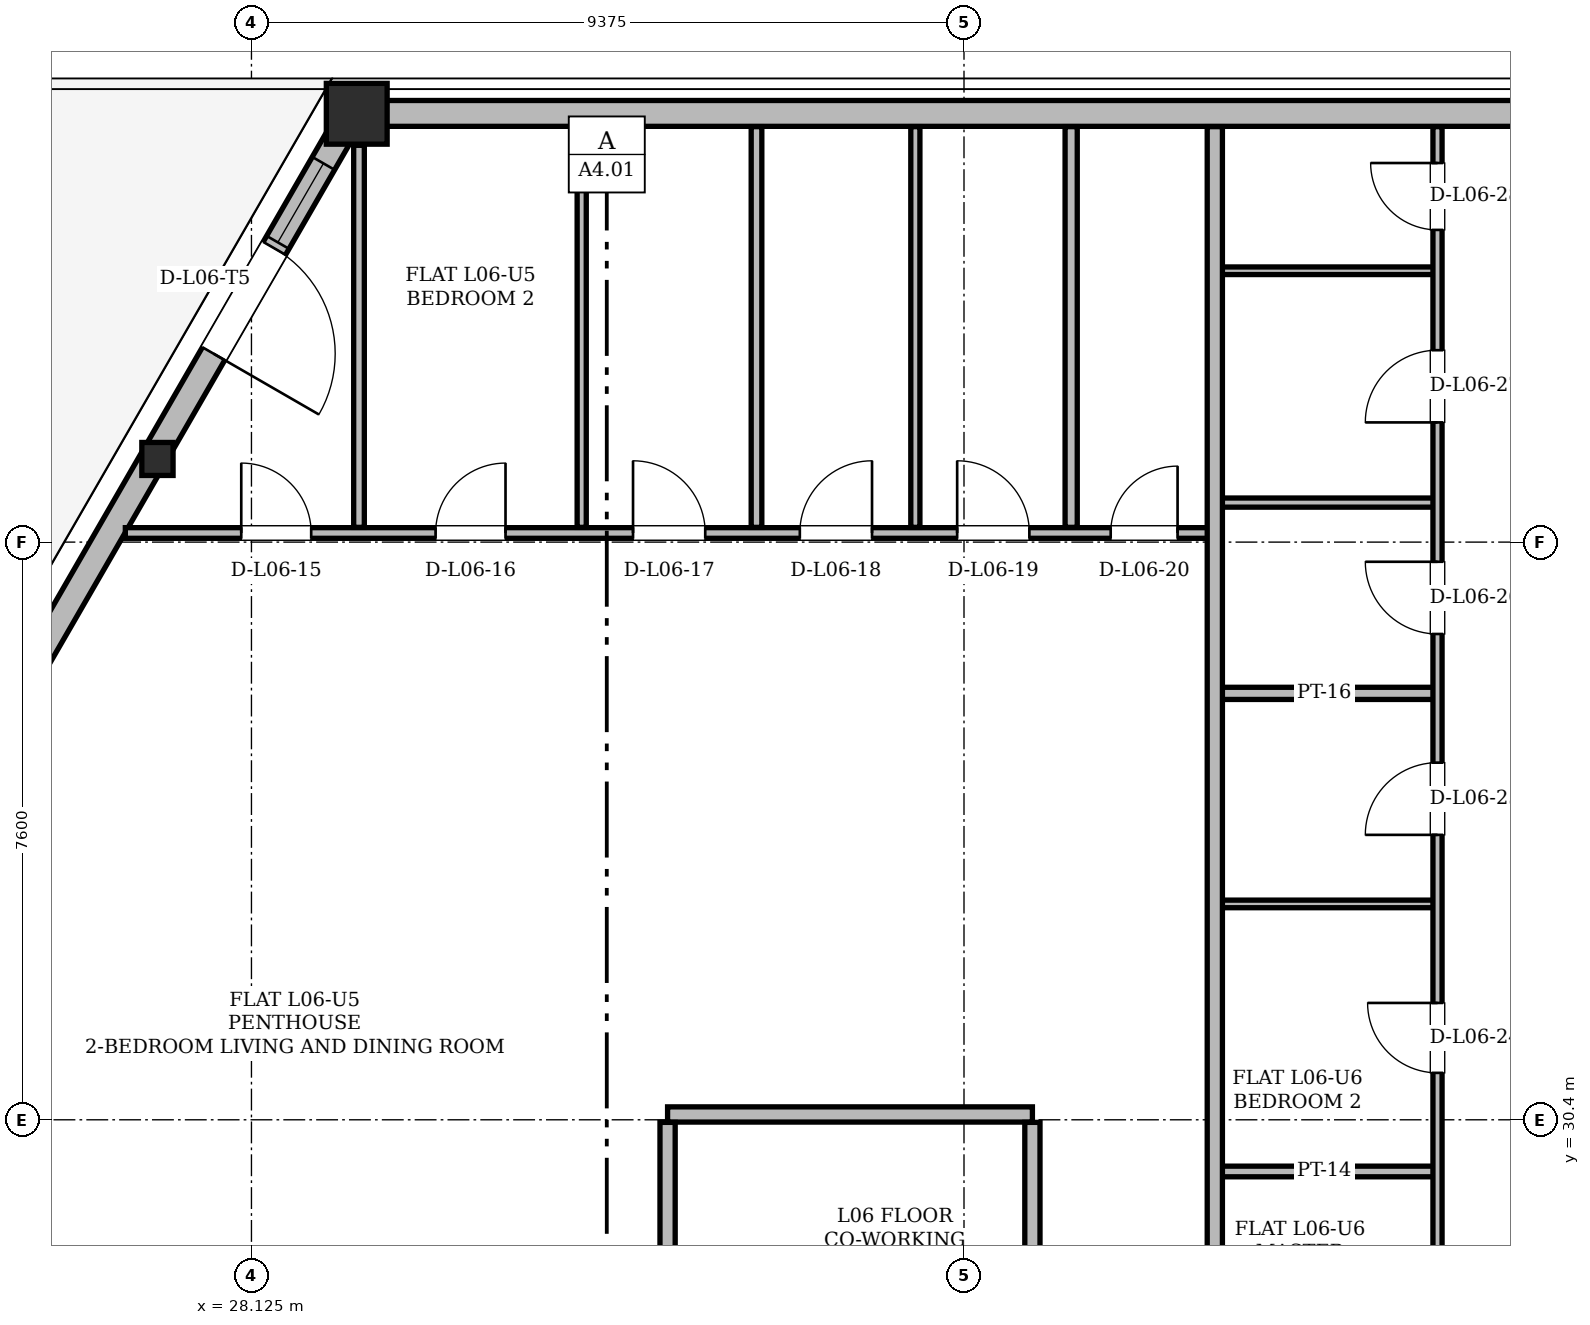
"""IFC4 building model, lengths in metres.
Left out: names, types, materials, properties, quantities, classifications, styles, units other than length and angle.
Written with IfcOpenShell. Run it as: python <this file> out.ifc"""

import sys

from ifc_helpers import new_model, si_unit, direction, frame, frame_2d, origin, origin_2d, place, context, subcontext, project, spatial, rectangle, hollow_rectangle, i_section, extrude, element, fill, save


model = new_model("IFC4")
c1 = context("Model", 3, precision=1e-05, world=origin(), true_north=direction((0.0, 1.0)))
c2 = subcontext(c1, "Body", "Model", "MODEL_VIEW")
j1 = project(units=[si_unit("LENGTHUNIT", "METRE"), si_unit("PLANEANGLEUNIT", "RADIAN")], contexts=[c1])
p1 = place(None, origin())
s1 = spatial("IfcSite", under=j1, at=p1, CompositionType="ELEMENT")
p2 = place(p1, origin())
s2 = spatial("IfcBuilding", under=s1, at=p2, CompositionType="ELEMENT")
p3 = place(p2, frame((0.0, 0.0, 27.3)))
s3 = spatial("IfcBuildingStorey", under=s2, at=p3, CompositionType="ELEMENT", Elevation=27.3)
p4 = place(p3, frame((29.452, 43.64, 0.01), z_axis=(0.032458269959, -0.002585774127, 0.999469746657), x_axis=(0.079412973799, 0.996841802691, 0.0)))
e1 = element("IfcColumn", 1, at=p4, inside=s3, PredefinedType="COLUMN", context=c2, shape_type="SweptSolid", body=[
    extrude(hollow_rectangle(XDim=0.8, YDim=0.8, WallThickness=0.065, at=origin_2d()), origin(), (0.0, 0.0, 1.0), 3.588),
])
p5 = place(p3, frame((26.834, 39.106, 0.004), z_axis=(0.030171215924, -0.006523506146, 0.999523457252), x_axis=(0.211332792528, 0.97741416544, 0.0)))
e2 = element("IfcColumn", 2, at=p5, inside=s3, PredefinedType="COLUMN", context=c2, shape_type="SweptSolid", body=[
    extrude(i_section(OverallWidth=0.411, OverallDepth=0.434, WebThickness=0.036, FlangeThickness=0.057, at=origin_2d()), origin(), (0.0, 0.0, 1.0), 3.593),
])
p6 = place(p3, frame((45.548, 43.64, 0.0), z_axis=(0.0, 0.0, 1.0), x_axis=(-1.0, 0.0, 0.0)))
e3 = element("IfcWall", 3, at=p6, inside=s3, PredefinedType="SOLIDWALL", context=c2, shape_type="SweptSolid", body=[
    extrude(rectangle(XDim=16.096, YDim=0.34, at=frame_2d((8.048, 0.0))), origin(), (0.0, 0.0, 1.0), 2.494),
])
p7 = place(p3, frame((29.452, 43.64, 0.0), z_axis=(0.0, 0.0, 1.0), x_axis=(-0.50000660679, -0.866021589319, 0.0)))
e4 = element("IfcWall", 4, at=p7, inside=s3, PredefinedType="SOLIDWALL", context=c2, shape_type="SweptSolid", body=[
    extrude(rectangle(XDim=32.724, YDim=0.34, at=frame_2d((16.362, 0.0))), origin(), (0.0, 0.0, 1.0), 2.494),
])
p8 = place(p7, frame((2.05, 0.0, 0.0)))
e5 = element("IfcOpeningElement", 5, at=p8, cuts=e4, PredefinedType="OPENING", context=c2, shape_type="SweptSolid", body=[
    extrude(rectangle(XDim=1.6, YDim=2.2, at=frame_2d((0.8, 1.1))), frame((0.0, 0.17, 0.0), z_axis=(0.0, -1.0, 0.0), x_axis=(1.0, 0.0, 0.0)), (0.0, 0.0, 1.0), 0.34),
])
p9 = place(p7, frame((24.19, 0.0, 0.85)))
e6 = element("IfcOpeningElement", 6, at=p9, cuts=e4, PredefinedType="OPENING", context=c2, shape_type="SweptSolid", body=[
    extrude(rectangle(XDim=1.2, YDim=1.48, at=frame_2d((0.6, 0.74))), frame((0.0, 0.17, 0.0), z_axis=(0.0, -1.0, 0.0), x_axis=(1.0, 0.0, 0.0)), (0.0, 0.0, 1.0), 0.34),
])
p10 = place(p7, frame((29.073, 0.0, 0.85)))
e7 = element("IfcOpeningElement", 7, at=p10, cuts=e4, PredefinedType="OPENING", context=c2, shape_type="SweptSolid", body=[
    extrude(rectangle(XDim=2.4, YDim=1.534, at=frame_2d((1.2, 0.767))), frame((0.0, 0.17, 0.0), z_axis=(0.0, -1.0, 0.0), x_axis=(1.0, 0.0, 0.0)), (0.0, 0.0, 1.0), 0.34),
])
p11 = place(p7, frame((10.766, 0.0, 0.85)))
e8 = element("IfcOpeningElement", 8, at=p11, cuts=e4, PredefinedType="OPENING", context=c2, shape_type="SweptSolid", body=[
    extrude(rectangle(XDim=2.5, YDim=1.534, at=frame_2d((1.25, 0.767))), frame((0.0, 0.17, 0.0), z_axis=(0.0, -1.0, 0.0), x_axis=(1.0, 0.0, 0.0)), (0.0, 0.0, 1.0), 0.34),
])
p12 = place(p7, frame((17.741, 0.0, 0.85)))
e9 = element("IfcOpeningElement", 9, at=p12, cuts=e4, PredefinedType="OPENING", context=c2, shape_type="SweptSolid", body=[
    extrude(rectangle(XDim=2.4, YDim=1.534, at=frame_2d((1.2, 0.767))), frame((0.0, 0.17, 0.0), z_axis=(0.0, -1.0, 0.0), x_axis=(1.0, 0.0, 0.0)), (0.0, 0.0, 1.0), 0.34),
])
p13 = place(p7, frame((0.759, 0.0, 0.85)))
e10 = element("IfcOpeningElement", 10, at=p13, cuts=e4, PredefinedType="OPENING", context=c2, shape_type="SweptSolid", body=[
    extrude(rectangle(XDim=1.2, YDim=1.48, at=frame_2d((0.6, 0.74))), frame((0.0, 0.17, 0.0), z_axis=(0.0, -1.0, 0.0), x_axis=(1.0, 0.0, 0.0)), (0.0, 0.0, 1.0), 0.34),
])
p14 = place(p3, frame((40.75, 29.72, 0.0), z_axis=(0.0, 0.0, 1.0), x_axis=(1.0, 0.0, 0.0)))
e11 = element("IfcWall", 11, at=p14, inside=s3, PredefinedType="PARTITIONING", context=c2, shape_type="SweptSolid", body=[
    extrude(rectangle(XDim=2.98, YDim=0.14, at=frame_2d((1.49, 0.0))), origin(), (0.0, 0.0, 1.0), 3.36),
])
p15 = place(p3, frame((33.6, 30.47, 0.0), z_axis=(0.0, 0.0, 1.0), x_axis=(1.0, 0.0, 0.0)))
e12 = element("IfcWall", 12, at=p15, inside=s3, PredefinedType="PARTITIONING", context=c2, shape_type="SweptSolid", body=[
    extrude(rectangle(XDim=4.8, YDim=0.2, at=frame_2d((2.4, 0.0))), origin(), (0.0, 0.0, 1.0), 3.36),
])
p16 = place(p3, frame((40.75, 33.24, 0.0), z_axis=(0.0, 0.0, 1.0), x_axis=(1.0, 0.0, 0.0)))
e13 = element("IfcWall", 13, at=p16, inside=s3, PredefinedType="PARTITIONING", context=c2, shape_type="SweptSolid", body=[
    extrude(rectangle(XDim=2.98, YDim=0.1, at=frame_2d((1.49, 0.0))), origin(), (0.0, 0.0, 1.0), 3.36),
])
p17 = place(p3, frame((40.75, 36.01, 0.0), z_axis=(0.0, 0.0, 1.0), x_axis=(1.0, 0.0, 0.0)))
e14 = element("IfcWall", 14, at=p17, inside=s3, PredefinedType="PARTITIONING", context=c2, shape_type="SweptSolid", body=[
    extrude(rectangle(XDim=2.98, YDim=0.16, at=frame_2d((1.49, 0.0))), origin(), (0.0, 0.0, 1.0), 3.36),
])
p18 = place(p3, frame((26.466, 38.12, 0.0), z_axis=(0.0, 0.0, 1.0), x_axis=(1.0, 0.0, 0.0)))
e15 = element("IfcWall", 15, at=p18, inside=s3, PredefinedType="PARTITIONING", context=c2, shape_type="SweptSolid", body=[
    extrude(rectangle(XDim=14.384, YDim=0.14, at=frame_2d((7.192, 0.0))), origin(), (0.0, 0.0, 1.0), 2.738),
])
p19 = place(p18, frame((1.525, 0.0, 0.0)))
e16 = element("IfcOpeningElement", 16, at=p19, cuts=e15, PredefinedType="OPENING", context=c2, shape_type="SweptSolid", body=[
    extrude(rectangle(XDim=0.92, YDim=2.12, at=frame_2d((0.46, 1.06))), frame((0.0, 0.07, 0.0), z_axis=(0.0, -1.0, 0.0), x_axis=(1.0, 0.0, 0.0)), (0.0, 0.0, 1.0), 0.14),
])
p20 = place(p18, frame((4.082, 0.0, 0.0)))
e17 = element("IfcOpeningElement", 17, at=p20, cuts=e15, PredefinedType="OPENING", context=c2, shape_type="SweptSolid", body=[
    extrude(rectangle(XDim=0.92, YDim=2.12, at=frame_2d((0.46, 1.06))), frame((0.0, 0.07, 0.0), z_axis=(0.0, -1.0, 0.0), x_axis=(1.0, 0.0, 0.0)), (0.0, 0.0, 1.0), 0.14),
])
p21 = place(p18, frame((6.68, 0.0, 0.0)))
e18 = element("IfcOpeningElement", 18, at=p21, cuts=e15, PredefinedType="OPENING", context=c2, shape_type="SweptSolid", body=[
    extrude(rectangle(XDim=0.95, YDim=2.1, at=frame_2d((0.475, 1.05))), frame((0.0, 0.07, 0.0), z_axis=(0.0, -1.0, 0.0), x_axis=(1.0, 0.0, 0.0)), (0.0, 0.0, 1.0), 0.14),
])
p22 = place(p18, frame((8.874, 0.0, 0.0)))
e19 = element("IfcOpeningElement", 19, at=p22, cuts=e15, PredefinedType="OPENING", context=c2, shape_type="SweptSolid", body=[
    extrude(rectangle(XDim=0.95, YDim=2.1, at=frame_2d((0.475, 1.05))), frame((0.0, 0.07, 0.0), z_axis=(0.0, -1.0, 0.0), x_axis=(1.0, 0.0, 0.0)), (0.0, 0.0, 1.0), 0.14),
])
p23 = place(p18, frame((10.944, 0.0, 0.0)))
e20 = element("IfcOpeningElement", 20, at=p23, cuts=e15, PredefinedType="OPENING", context=c2, shape_type="SweptSolid", body=[
    extrude(rectangle(XDim=0.95, YDim=2.1, at=frame_2d((0.475, 1.05))), frame((0.0, 0.07, 0.0), z_axis=(0.0, -1.0, 0.0), x_axis=(1.0, 0.0, 0.0)), (0.0, 0.0, 1.0), 0.14),
])
p24 = place(p18, frame((12.964, 0.0, 0.0)))
e21 = element("IfcOpeningElement", 21, at=p24, cuts=e15, PredefinedType="OPENING", context=c2, shape_type="SweptSolid", body=[
    extrude(rectangle(XDim=0.88, YDim=2.08, at=frame_2d((0.44, 1.04))), frame((0.0, 0.07, 0.0), z_axis=(0.0, -1.0, 0.0), x_axis=(1.0, 0.0, 0.0)), (0.0, 0.0, 1.0), 0.14),
])
p25 = place(p3, frame((40.75, 38.52, 0.0), z_axis=(0.0, 0.0, 1.0), x_axis=(1.0, 0.0, 0.0)))
e22 = element("IfcWall", 22, at=p25, inside=s3, PredefinedType="PARTITIONING", context=c2, shape_type="SweptSolid", body=[
    extrude(rectangle(XDim=2.98, YDim=0.12, at=frame_2d((1.49, 0.0))), origin(), (0.0, 0.0, 1.0), 3.36),
])
p26 = place(p3, frame((40.75, 41.57, 0.0), z_axis=(0.0, 0.0, 1.0), x_axis=(1.0, 0.0, 0.0)))
e23 = element("IfcWall", 23, at=p26, inside=s3, PredefinedType="PARTITIONING", context=c2, shape_type="SweptSolid", body=[
    extrude(rectangle(XDim=2.98, YDim=0.1, at=frame_2d((1.49, 0.0))), origin(), (0.0, 0.0, 1.0), 3.36),
])
p27 = place(p3, frame((29.54, 38.194, 0.0), z_axis=(0.0, 0.0, 1.0), x_axis=(0.0, 1.0, 0.0)))
e24 = element("IfcWall", 24, at=p27, inside=s3, PredefinedType="PARTITIONING", context=c2, shape_type="SweptSolid", body=[
    extrude(rectangle(XDim=5.026, YDim=0.14, at=frame_2d((2.513, 0.0))), origin(), (0.0, 0.0, 1.0), 2.738),
])
p28 = place(p3, frame((32.47, 38.194, 0.0), z_axis=(0.0, 0.0, 1.0), x_axis=(0.0, 1.0, 0.0)))
e25 = element("IfcWall", 25, at=p28, inside=s3, PredefinedType="PARTITIONING", context=c2, shape_type="SweptSolid", body=[
    extrude(rectangle(XDim=5.272, YDim=0.12, at=frame_2d((2.636, 0.0))), origin(), (0.0, 0.0, 1.0), 3.36),
])
p29 = place(p3, frame((33.6, 26.074, 0.0), z_axis=(0.0, 0.0, 1.0), x_axis=(0.0, 1.0, 0.0)))
e26 = element("IfcWall", 26, at=p29, inside=s3, PredefinedType="PARTITIONING", context=c2, shape_type="SweptSolid", body=[
    extrude(rectangle(XDim=4.292, YDim=0.2, at=frame_2d((2.146, 0.0))), origin(), (0.0, 0.0, 1.0), 3.36),
])
p30 = place(p3, frame((34.77, 38.194, 0.0), z_axis=(0.0, 0.0, 1.0), x_axis=(0.0, 1.0, 0.0)))
e27 = element("IfcWall", 27, at=p30, inside=s3, PredefinedType="PARTITIONING", context=c2, shape_type="SweptSolid", body=[
    extrude(rectangle(XDim=5.272, YDim=0.14, at=frame_2d((2.636, 0.0))), origin(), (0.0, 0.0, 1.0), 3.36),
])
p31 = place(p3, frame((36.86, 38.194, 0.0), z_axis=(0.0, 0.0, 1.0), x_axis=(0.0, 1.0, 0.0)))
e28 = element("IfcWall", 28, at=p31, inside=s3, PredefinedType="PARTITIONING", context=c2, shape_type="SweptSolid", body=[
    extrude(rectangle(XDim=5.272, YDim=0.12, at=frame_2d((2.636, 0.0))), origin(), (0.0, 0.0, 1.0), 3.36),
])
p32 = place(p3, frame((38.4, 26.074, 0.0), z_axis=(0.0, 0.0, 1.0), x_axis=(0.0, 1.0, 0.0)))
e29 = element("IfcWall", 29, at=p32, inside=s3, PredefinedType="PARTITIONING", context=c2, shape_type="SweptSolid", body=[
    extrude(rectangle(XDim=4.292, YDim=0.2, at=frame_2d((2.146, 0.0))), origin(), (0.0, 0.0, 1.0), 3.36),
])
p33 = place(p3, frame((38.91, 38.194, 0.0), z_axis=(0.0, 0.0, 1.0), x_axis=(0.0, 1.0, 0.0)))
e30 = element("IfcWall", 30, at=p33, inside=s3, PredefinedType="PARTITIONING", context=c2, shape_type="SweptSolid", body=[
    extrude(rectangle(XDim=5.272, YDim=0.16, at=frame_2d((2.636, 0.0))), origin(), (0.0, 0.0, 1.0), 3.36),
])
p34 = place(p3, frame((40.8, 26.074, 0.0), z_axis=(0.0, 0.0, 1.0), x_axis=(0.0, 1.0, 0.0)))
e31 = element("IfcWall", 31, at=p34, inside=s3, PredefinedType="PARTITIONING", context=c2, shape_type="SweptSolid", body=[
    extrude(rectangle(XDim=17.392, YDim=0.2, at=frame_2d((8.696, 0.0))), origin(), (0.0, 0.0, 1.0), 3.36),
])
p35 = place(p3, frame((43.73, 26.074, 0.0), z_axis=(0.0, 0.0, 1.0), x_axis=(0.0, 1.0, 0.0)))
e32 = element("IfcWall", 32, at=p35, inside=s3, PredefinedType="PARTITIONING", context=c2, shape_type="SweptSolid", body=[
    extrude(rectangle(XDim=17.392, YDim=0.12, at=frame_2d((8.696, 0.0))), origin(), (0.0, 0.0, 1.0), 3.36),
])
p36 = place(p35, frame((1.294, 0.0, 0.0)))
e33 = element("IfcOpeningElement", 33, at=p36, cuts=e32, PredefinedType="OPENING", context=c2, shape_type="SweptSolid", body=[
    extrude(rectangle(XDim=0.92, YDim=2.12, at=frame_2d((0.46, 1.06))), frame((0.0, 0.06, 0.0), z_axis=(0.0, -1.0, 0.0), x_axis=(1.0, 0.0, 0.0)), (0.0, 0.0, 1.0), 0.12),
])
p37 = place(p35, frame((4.943, 0.0, 0.0)))
e34 = element("IfcOpeningElement", 34, at=p37, cuts=e32, PredefinedType="OPENING", context=c2, shape_type="SweptSolid", body=[
    extrude(rectangle(XDim=0.92, YDim=2.12, at=frame_2d((0.46, 1.06))), frame((0.0, 0.06, 0.0), z_axis=(0.0, -1.0, 0.0), x_axis=(1.0, 0.0, 0.0)), (0.0, 0.0, 1.0), 0.12),
])
p38 = place(p35, frame((8.074, 0.0, 0.0)))
e35 = element("IfcOpeningElement", 35, at=p38, cuts=e32, PredefinedType="OPENING", context=c2, shape_type="SweptSolid", body=[
    extrude(rectangle(XDim=0.95, YDim=2.1, at=frame_2d((0.475, 1.05))), frame((0.0, 0.06, 0.0), z_axis=(0.0, -1.0, 0.0), x_axis=(1.0, 0.0, 0.0)), (0.0, 0.0, 1.0), 0.12),
])
p39 = place(p35, frame((10.717, 0.0, 0.0)))
e36 = element("IfcOpeningElement", 36, at=p39, cuts=e32, PredefinedType="OPENING", context=c2, shape_type="SweptSolid", body=[
    extrude(rectangle(XDim=0.95, YDim=2.1, at=frame_2d((0.475, 1.05))), frame((0.0, 0.06, 0.0), z_axis=(0.0, -1.0, 0.0), x_axis=(1.0, 0.0, 0.0)), (0.0, 0.0, 1.0), 0.12),
])
p40 = place(p35, frame((13.501, 0.0, 0.0)))
e37 = element("IfcOpeningElement", 37, at=p40, cuts=e32, PredefinedType="OPENING", context=c2, shape_type="SweptSolid", body=[
    extrude(rectangle(XDim=0.95, YDim=2.1, at=frame_2d((0.475, 1.05))), frame((0.0, 0.06, 0.0), z_axis=(0.0, -1.0, 0.0), x_axis=(1.0, 0.0, 0.0)), (0.0, 0.0, 1.0), 0.12),
])
p41 = place(p35, frame((16.033, 0.0, 0.0)))
e38 = element("IfcOpeningElement", 38, at=p41, cuts=e32, PredefinedType="OPENING", context=c2, shape_type="SweptSolid", body=[
    extrude(rectangle(XDim=0.88, YDim=2.08, at=frame_2d((0.44, 1.04))), frame((0.0, 0.06, 0.0), z_axis=(0.0, -1.0, 0.0), x_axis=(1.0, 0.0, 0.0)), (0.0, 0.0, 1.0), 0.12),
])
p42 = place(p8, origin())
e39 = element("IfcDoor", 39, at=p42, inside=s3, OperationType="SINGLE_SWING_RIGHT", PredefinedType="DOOR", context=c2, shape_type="SweptSolid", body=[
    extrude(rectangle(XDim=1.6, YDim=2.2, at=frame_2d((0.8, 1.1))), frame((0.0, 0.025, 0.0), z_axis=(0.0, -1.0, 0.0), x_axis=(1.0, 0.0, 0.0)), (0.0, 0.0, 1.0), 0.05),
])
fill(e5, e39)
p43 = place(p13, origin())
e40 = element("IfcWindow", 40, at=p43, inside=s3, PartitioningType="SINGLE_PANEL", PredefinedType="WINDOW", context=c2, shape_type="SweptSolid", body=[
    extrude(rectangle(XDim=1.2, YDim=1.48, at=frame_2d((0.6, 0.74))), frame((0.0, 0.03, 0.0), z_axis=(0.0, -1.0, 0.0), x_axis=(1.0, 0.0, 0.0)), (0.0, 0.0, 1.0), 0.06),
])
fill(e10, e40)
p44 = place(p19, origin())
e41 = element("IfcDoor", 41, at=p44, inside=s3, OperationType="SINGLE_SWING_LEFT", PredefinedType="DOOR", context=c2, shape_type="SweptSolid", body=[
    extrude(rectangle(XDim=0.92, YDim=2.12, at=frame_2d((0.46, 1.06))), frame((0.0, 0.025, 0.0), z_axis=(0.0, -1.0, 0.0), x_axis=(1.0, 0.0, 0.0)), (0.0, 0.0, 1.0), 0.05),
])
fill(e16, e41)
p45 = place(p20, origin())
e42 = element("IfcDoor", 42, at=p45, inside=s3, OperationType="SINGLE_SWING_RIGHT", PredefinedType="DOOR", context=c2, shape_type="SweptSolid", body=[
    extrude(rectangle(XDim=0.92, YDim=2.12, at=frame_2d((0.46, 1.06))), frame((0.0, 0.025, 0.0), z_axis=(0.0, -1.0, 0.0), x_axis=(1.0, 0.0, 0.0)), (0.0, 0.0, 1.0), 0.05),
])
fill(e17, e42)
p46 = place(p21, origin())
e43 = element("IfcDoor", 43, at=p46, inside=s3, OperationType="SINGLE_SWING_LEFT", PredefinedType="DOOR", context=c2, shape_type="SweptSolid", body=[
    extrude(rectangle(XDim=0.95, YDim=2.1, at=frame_2d((0.475, 1.05))), frame((0.0, 0.025, 0.0), z_axis=(0.0, -1.0, 0.0), x_axis=(1.0, 0.0, 0.0)), (0.0, 0.0, 1.0), 0.05),
])
fill(e18, e43)
p47 = place(p22, origin())
e44 = element("IfcDoor", 44, at=p47, inside=s3, OperationType="SINGLE_SWING_RIGHT", PredefinedType="DOOR", context=c2, shape_type="SweptSolid", body=[
    extrude(rectangle(XDim=0.95, YDim=2.1, at=frame_2d((0.475, 1.05))), frame((0.0, 0.025, 0.0), z_axis=(0.0, -1.0, 0.0), x_axis=(1.0, 0.0, 0.0)), (0.0, 0.0, 1.0), 0.05),
])
fill(e19, e44)
p48 = place(p23, origin())
e45 = element("IfcDoor", 45, at=p48, inside=s3, OperationType="SINGLE_SWING_LEFT", PredefinedType="DOOR", context=c2, shape_type="SweptSolid", body=[
    extrude(rectangle(XDim=0.95, YDim=2.1, at=frame_2d((0.475, 1.05))), frame((0.0, 0.025, 0.0), z_axis=(0.0, -1.0, 0.0), x_axis=(1.0, 0.0, 0.0)), (0.0, 0.0, 1.0), 0.05),
])
fill(e20, e45)
p49 = place(p24, origin())
e46 = element("IfcDoor", 46, at=p49, inside=s3, OperationType="SINGLE_SWING_RIGHT", PredefinedType="DOOR", context=c2, shape_type="SweptSolid", body=[
    extrude(rectangle(XDim=0.88, YDim=2.08, at=frame_2d((0.44, 1.04))), frame((0.0, 0.025, 0.0), z_axis=(0.0, -1.0, 0.0), x_axis=(1.0, 0.0, 0.0)), (0.0, 0.0, 1.0), 0.05),
])
fill(e21, e46)
p50 = place(p37, origin())
e47 = element("IfcDoor", 47, at=p50, inside=s3, OperationType="SINGLE_SWING_RIGHT", PredefinedType="DOOR", context=c2, shape_type="SweptSolid", body=[
    extrude(rectangle(XDim=0.92, YDim=2.12, at=frame_2d((0.46, 1.06))), frame((0.0, 0.025, 0.0), z_axis=(0.0, -1.0, 0.0), x_axis=(1.0, 0.0, 0.0)), (0.0, 0.0, 1.0), 0.05),
])
fill(e34, e47)
p51 = place(p38, origin())
e48 = element("IfcDoor", 48, at=p51, inside=s3, OperationType="SINGLE_SWING_LEFT", PredefinedType="DOOR", context=c2, shape_type="SweptSolid", body=[
    extrude(rectangle(XDim=0.95, YDim=2.1, at=frame_2d((0.475, 1.05))), frame((0.0, 0.025, 0.0), z_axis=(0.0, -1.0, 0.0), x_axis=(1.0, 0.0, 0.0)), (0.0, 0.0, 1.0), 0.05),
])
fill(e35, e48)
p52 = place(p39, origin())
e49 = element("IfcDoor", 49, at=p52, inside=s3, OperationType="SINGLE_SWING_RIGHT", PredefinedType="DOOR", context=c2, shape_type="SweptSolid", body=[
    extrude(rectangle(XDim=0.95, YDim=2.1, at=frame_2d((0.475, 1.05))), frame((0.0, 0.025, 0.0), z_axis=(0.0, -1.0, 0.0), x_axis=(1.0, 0.0, 0.0)), (0.0, 0.0, 1.0), 0.05),
])
fill(e36, e49)
p53 = place(p40, origin())
e50 = element("IfcDoor", 50, at=p53, inside=s3, OperationType="SINGLE_SWING_LEFT", PredefinedType="DOOR", context=c2, shape_type="SweptSolid", body=[
    extrude(rectangle(XDim=0.95, YDim=2.1, at=frame_2d((0.475, 1.05))), frame((0.0, 0.025, 0.0), z_axis=(0.0, -1.0, 0.0), x_axis=(1.0, 0.0, 0.0)), (0.0, 0.0, 1.0), 0.05),
])
fill(e37, e50)
p54 = place(p41, origin())
e51 = element("IfcDoor", 51, at=p54, inside=s3, OperationType="SINGLE_SWING_RIGHT", PredefinedType="DOOR", context=c2, shape_type="SweptSolid", body=[
    extrude(rectangle(XDim=0.88, YDim=2.08, at=frame_2d((0.44, 1.04))), frame((0.0, 0.025, 0.0), z_axis=(0.0, -1.0, 0.0), x_axis=(1.0, 0.0, 0.0)), (0.0, 0.0, 1.0), 0.05),
])
fill(e38, e51)
save(model, sys.argv[1])
